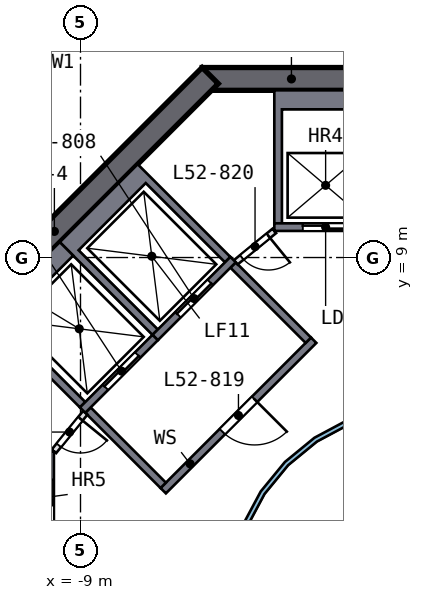
"""IFC4 building model, lengths in metres.
Left out: names, types, materials, properties, quantities, classifications, styles, units other than length and angle.
Written with IfcOpenShell. Run it as: python <this file> out.ifc"""

import sys

from ifc_helpers import new_model, si_unit, direction, frame, frame_2d, origin, place, context, subcontext, project, spatial, polyline, rectangle, outline, extrude, element, fill, save


model = new_model("IFC4")
c1 = context("Model", 3, precision=1e-05, world=origin(), true_north=direction((0.0, 1.0)))
c2 = subcontext(c1, "Body", "Model", "MODEL_VIEW")
j1 = project(units=[si_unit("LENGTHUNIT", "METRE"), si_unit("PLANEANGLEUNIT", "RADIAN")], contexts=[c1])
p1 = place(None, origin())
s1 = spatial("IfcSite", under=j1, at=p1, CompositionType="ELEMENT")
p2 = place(p1, origin())
s2 = spatial("IfcBuilding", under=s1, at=p2, CompositionType="ELEMENT")
p3 = place(p2, frame((0.0, 0.0, 212.5)))
s3 = spatial("IfcBuildingStorey", under=s2, at=p3, CompositionType="ELEMENT", Elevation=212.5)
p4 = place(p3, frame((5.799, 13.7, 0.0), z_axis=(0.0, 0.0, 1.0), x_axis=(-1.0, 0.0, 0.0)))
e1 = element("IfcWall", 1, at=p4, inside=s3, PredefinedType="SHEAR", context=c2, shape_type="SweptSolid", body=[
    extrude(rectangle(XDim=11.598, YDim=0.6, at=frame_2d((5.799, 0.0))), origin(), (0.0, 0.0, 1.0), 3.5),
])
p5 = place(p4, frame((4.899, 0.0, 0.0)))
e2 = element("IfcOpeningElement", 2, at=p5, cuts=e1, PredefinedType="OPENING", context=c2, shape_type="SweptSolid", body=[
    extrude(rectangle(XDim=1.8, YDim=2.1, at=frame_2d((0.9, 1.05))), frame((0.0, 0.31, 0.0), z_axis=(0.0, -1.0, 0.0), x_axis=(1.0, 0.0, 0.0)), (0.0, 0.0, 1.0), 0.62),
])
p6 = place(p3, frame((-5.587, 13.788, 0.0), z_axis=(0.0, 0.0, 1.0), x_axis=(-0.707106781, -0.707106781, 0.0)))
e3 = element("IfcWall", 3, at=p6, inside=s3, PredefinedType="SHEAR", context=c2, shape_type="SweptSolid", body=[
    extrude(rectangle(XDim=11.598, YDim=0.6, at=frame_2d((5.799, 0.0))), origin(), (0.0, 0.0, 1.0), 3.5),
])
p7 = place(p3, origin())
e4 = element("IfcWall", 4, at=p7, inside=s3, PredefinedType="SOLIDWALL", context=c2, shape_type="SweptSolid", body=[
    extrude(outline(polyline([(-3.9, 13.4), (-1.2, 13.4), (-1.2, 9.9), (-1.4, 9.9), (-1.4, 12.9), (-3.7, 12.9), (-3.7, 9.9), (-3.9, 9.9), (-3.9, 13.4)])), origin(), (0.0, 0.0, 1.0), 3.0),
])
p8 = place(p3, frame((-1.2, 9.8, 0.0), z_axis=(0.0, 0.0, 1.0), x_axis=(-1.0, 0.0, 0.0)))
e5 = element("IfcWall", 5, at=p8, inside=s3, PredefinedType="SOLIDWALL", context=c2, shape_type="SweptSolid", body=[
    extrude(rectangle(XDim=2.7, YDim=0.2, at=frame_2d((1.35, 0.0))), origin(), (0.0, 0.0, 1.0), 3.0),
])
p9 = place(p8, frame((0.75, 0.0, 0.0)))
e6 = element("IfcOpeningElement", 6, at=p9, cuts=e5, PredefinedType="OPENING", context=c2, shape_type="SweptSolid", body=[
    extrude(rectangle(XDim=1.2, YDim=2.1, at=frame_2d((0.6, 1.05))), frame((0.0, 0.11, 0.0), z_axis=(0.0, -1.0, 0.0), x_axis=(1.0, 0.0, 0.0)), (0.0, 0.0, 1.0), 0.22),
])
p10 = place(p3, frame((-9.8, 1.2, 0.0), z_axis=(0.0, 0.0, 1.0), x_axis=(0.0, 1.0, 0.0)))
e7 = element("IfcWall", 7, at=p10, inside=s3, PredefinedType="SOLIDWALL", context=c2, shape_type="SweptSolid", body=[
    extrude(rectangle(XDim=2.7, YDim=0.2, at=frame_2d((1.35, 0.0))), origin(), (0.0, 0.0, 1.0), 3.0),
])
p11 = place(p10, frame((0.75, 0.0, 0.0)))
e8 = element("IfcOpeningElement", 8, at=p11, cuts=e7, PredefinedType="OPENING", context=c2, shape_type="SweptSolid", body=[
    extrude(rectangle(XDim=1.2, YDim=2.1, at=frame_2d((0.6, 1.05))), frame((0.0, 0.11, 0.0), z_axis=(0.0, -1.0, 0.0), x_axis=(1.0, 0.0, 0.0)), (0.0, 0.0, 1.0), 0.22),
])
p12 = place(p3, origin())
e9 = element("IfcWall", 9, at=p12, inside=s3, PredefinedType="SOLIDWALL", context=c2, shape_type="SweptSolid", body=[
    extrude(outline(polyline([(-9.546, 9.405), (-7.495, 11.455), (-5.056, 9.016), (-5.197, 8.874), (-7.283, 10.96), (-9.051, 9.192), (-6.965, 7.106), (-7.106, 6.965), (-9.546, 9.405)])), origin(), (0.0, 0.0, 1.0), 3.0),
])
p13 = place(p3, frame((-4.985, 8.945, 0.0), z_axis=(0.0, 0.0, 1.0), x_axis=(-0.707106781, -0.707106781, 0.0)))
e10 = element("IfcWall", 10, at=p13, inside=s3, PredefinedType="SOLIDWALL", context=c2, shape_type="SweptSolid", body=[
    extrude(rectangle(XDim=2.9, YDim=0.2, at=frame_2d((1.45, 0.0))), origin(), (0.0, 0.0, 1.0), 3.0),
])
p14 = place(p13, frame((0.85, 0.0, 0.0)))
e11 = element("IfcOpeningElement", 11, at=p14, cuts=e10, PredefinedType="OPENING", context=c2, shape_type="SweptSolid", body=[
    extrude(rectangle(XDim=1.2, YDim=2.1, at=frame_2d((0.6, 1.05))), frame((0.0, 0.11, 0.0), z_axis=(0.0, -1.0, 0.0), x_axis=(1.0, 0.0, 0.0)), (0.0, 0.0, 1.0), 0.22),
])
p15 = place(p3, origin())
e12 = element("IfcWall", 12, at=p15, inside=s3, PredefinedType="SOLIDWALL", context=c2, shape_type="SweptSolid", body=[
    extrude(outline(polyline([(-11.455, 7.495), (-9.546, 9.405), (-9.192, 9.051), (-10.96, 7.283), (-8.874, 5.197), (-9.016, 5.056), (-11.455, 7.495)])), origin(), (0.0, 0.0, 1.0), 3.0),
])
p16 = place(p3, frame((-7.036, 6.894, 0.0), z_axis=(0.0, 0.0, 1.0), x_axis=(-0.707106781, -0.707106781, 0.0)))
e13 = element("IfcWall", 13, at=p16, inside=s3, PredefinedType="SOLIDWALL", context=c2, shape_type="SweptSolid", body=[
    extrude(rectangle(XDim=2.7, YDim=0.2, at=frame_2d((1.35, 0.0))), origin(), (0.0, 0.0, 1.0), 3.0),
])
p17 = place(p16, frame((0.65, 0.0, 0.0)))
e14 = element("IfcOpeningElement", 14, at=p17, cuts=e13, PredefinedType="OPENING", context=c2, shape_type="SweptSolid", body=[
    extrude(rectangle(XDim=1.2, YDim=2.1, at=frame_2d((0.6, 1.05))), frame((0.0, 0.11, 0.0), z_axis=(0.0, -1.0, 0.0), x_axis=(1.0, 0.0, 0.0)), (0.0, 0.0, 1.0), 0.22),
])
p18 = place(p3, frame((-2.864, 6.823, 0.0), z_axis=(0.0, 0.0, 1.0), x_axis=(-0.707106781, -0.707106781, 0.0)))
e15 = element("IfcWall", 15, at=p18, inside=s3, PredefinedType="SOLIDWALL", context=c2, shape_type="SweptSolid", body=[
    extrude(rectangle(XDim=5.6, YDim=0.2, at=frame_2d((2.8, 0.0))), origin(), (0.0, 0.0, 1.0), 3.0),
])
p19 = place(p18, frame((2.2, 0.0, 0.0)))
e16 = element("IfcOpeningElement", 16, at=p19, cuts=e15, PredefinedType="OPENING", context=c2, shape_type="SweptSolid", body=[
    extrude(rectangle(XDim=1.2, YDim=2.1, at=frame_2d((0.6, 1.05))), frame((0.0, 0.11, 0.0), z_axis=(0.0, -1.0, 0.0), x_axis=(1.0, 0.0, 0.0)), (0.0, 0.0, 1.0), 0.22),
])
for number, where, z_axis, x_axis in (
    (17, (-3.005, 6.823, 0.0), (0.0, 0.0, 1.0), (-0.707, 0.707, 0.0)),
    (18, (-6.823, 3.005, 0.0), (0.0, 0.0, 1.0), (-0.707, 0.707, 0.0)),
):
    element("IfcWall", number, at=place(p3, frame(where, z_axis=z_axis, x_axis=x_axis)), inside=s3, PredefinedType="SOLIDWALL", context=c2, shape_type="SweptSolid", body=[
        extrude(rectangle(XDim=2.8, YDim=0.2, at=frame_2d((1.4, 0.0))), origin(), (0.0, 0.0, 1.0), 3.0),
    ])
p20 = place(p3, frame((-3.9, 9.7, 0.0), z_axis=(0.0, 0.0, 1.0), x_axis=(-0.775559878, -0.631274009, 0.0)))
e19 = element("IfcWall", 19, at=p20, inside=s3, PredefinedType="PARTITIONING", context=c2, shape_type="SweptSolid", body=[
    extrude(rectangle(XDim=1.308, YDim=0.15, at=frame_2d((0.654, 0.0))), origin(), (0.0, 0.0, 1.0), 3.0),
])
p21 = place(p20, frame((0.204, 0.0, 0.0)))
e20 = element("IfcOpeningElement", 20, at=p21, cuts=e19, PredefinedType="OPENING", context=c2, shape_type="SweptSolid", body=[
    extrude(rectangle(XDim=0.9, YDim=2.1, at=frame_2d((0.45, 1.05))), frame((0.0, 0.085, 0.0), z_axis=(0.0, -1.0, 0.0), x_axis=(1.0, 0.0, 0.0)), (0.0, 0.0, 1.0), 0.17),
])
p22 = place(p3, frame((-8.874, 4.914, 0.0), z_axis=(0.0, 0.0, 1.0), x_axis=(-0.631274009, -0.775559878, 0.0)))
e21 = element("IfcWall", 21, at=p22, inside=s3, PredefinedType="PARTITIONING", context=c2, shape_type="SweptSolid", body=[
    extrude(rectangle(XDim=1.308, YDim=0.15, at=frame_2d((0.654, 0.0))), origin(), (0.0, 0.0, 1.0), 3.0),
])
p23 = place(p22, frame((0.204, 0.0, 0.0)))
e22 = element("IfcOpeningElement", 22, at=p23, cuts=e21, PredefinedType="OPENING", context=c2, shape_type="SweptSolid", body=[
    extrude(rectangle(XDim=0.9, YDim=2.1, at=frame_2d((0.45, 1.05))), frame((0.0, 0.085, 0.0), z_axis=(0.0, -1.0, 0.0), x_axis=(1.0, 0.0, 0.0)), (0.0, 0.0, 1.0), 0.17),
])
p24 = place(p3, origin())
e23 = element("IfcWall", 23, at=p24, inside=s3, PredefinedType="SOLIDWALL", context=c2, shape_type="SweptSolid", body=[
    extrude(outline(polyline([(5.021, -0.999), (4.73, -1.959), (4.257, -2.844), (3.62, -3.62), (2.844, -4.257), (1.959, -4.73), (0.999, -5.021), (0.0, -5.12), (-0.999, -5.021), (-1.959, -4.73), (-2.844, -4.257), (-3.62, -3.62), (-4.257, -2.844), (-4.73, -1.959), (-5.021, -0.999), (-5.12, 0.0), (-5.021, 0.999), (-4.73, 1.959), (-4.257, 2.844), (-3.62, 3.62), (-2.844, 4.257), (-1.959, 4.73), (-0.999, 5.021), (0.0, 5.12), (0.999, 5.021), (1.959, 4.73), (2.844, 4.257), (3.62, 3.62), (4.257, 2.844), (4.73, 1.959), (5.021, 0.999), (5.12, 0.0), (5.021, -0.999)]), holes=[polyline([(4.904, 0.976), (4.619, 1.913), (4.157, 2.778), (3.535, 3.535), (2.778, 4.157), (1.913, 4.619), (0.976, 4.904), (0.0, 5.0), (-0.976, 4.904), (-1.913, 4.619), (-2.778, 4.157), (-3.535, 3.535), (-4.157, 2.778), (-4.619, 1.913), (-4.904, 0.976), (-5.0, 0.0), (-4.904, -0.976), (-4.619, -1.913), (-4.157, -2.778), (-3.535, -3.535), (-2.778, -4.157), (-1.913, -4.619), (-0.976, -4.904), (0.0, -5.0), (0.976, -4.904), (1.913, -4.619), (2.778, -4.157), (3.535, -3.535), (4.157, -2.778), (4.619, -1.913), (4.904, -0.976), (5.0, 0.0), (4.904, 0.976)])]), origin(), (0.0, 0.0, 1.0), 3.0),
])
p25 = place(p3, frame((-8.958, 16.055, 0.0), z_axis=(0.0, 0.0, 1.0), x_axis=(-0.717408019, -0.696653238, 0.0)))
e24 = element("IfcWall", 24, at=p25, inside=s3, PredefinedType="SOLIDWALL", context=c2, shape_type="SweptSolid", body=[
    extrude(rectangle(XDim=3.658, YDim=0.2, at=frame_2d((1.829, 0.0))), origin(), (0.0, 0.0, 1.0), 3.0),
])
p26 = place(p9, origin())
e25 = element("IfcDoor", 25, at=p26, inside=s3, OperationType="DOUBLE_DOOR_SLIDING", PredefinedType="DOOR", context=c2, shape_type="SweptSolid", body=[
    extrude(rectangle(XDim=1.2, YDim=2.1, at=frame_2d((0.6, 1.05))), frame((0.0, 0.025, 0.0), z_axis=(0.0, -1.0, 0.0), x_axis=(1.0, 0.0, 0.0)), (0.0, 0.0, 1.0), 0.05),
])
fill(e6, e25)
p27 = place(p14, origin())
e26 = element("IfcDoor", 26, at=p27, inside=s3, OperationType="DOUBLE_DOOR_SLIDING", PredefinedType="DOOR", context=c2, shape_type="SweptSolid", body=[
    extrude(rectangle(XDim=1.2, YDim=2.1, at=frame_2d((0.6, 1.05))), frame((0.0, 0.025, 0.0), z_axis=(0.0, -1.0, 0.0), x_axis=(1.0, 0.0, 0.0)), (0.0, 0.0, 1.0), 0.05),
])
fill(e11, e26)
p28 = place(p17, origin())
e27 = element("IfcDoor", 27, at=p28, inside=s3, OperationType="DOUBLE_DOOR_SLIDING", PredefinedType="DOOR", context=c2, shape_type="SweptSolid", body=[
    extrude(rectangle(XDim=1.2, YDim=2.1, at=frame_2d((0.6, 1.05))), frame((0.0, 0.025, 0.0), z_axis=(0.0, -1.0, 0.0), x_axis=(1.0, 0.0, 0.0)), (0.0, 0.0, 1.0), 0.05),
])
fill(e14, e27)
p29 = place(p19, origin())
e28 = element("IfcDoor", 28, at=p29, inside=s3, OperationType="SINGLE_SWING_LEFT", PredefinedType="DOOR", context=c2, shape_type="SweptSolid", body=[
    extrude(rectangle(XDim=1.2, YDim=2.1, at=frame_2d((0.6, 1.05))), frame((0.0, 0.025, 0.0), z_axis=(0.0, -1.0, 0.0), x_axis=(1.0, 0.0, 0.0)), (0.0, 0.0, 1.0), 0.05),
])
fill(e16, e28)
p30 = place(p21, origin())
e29 = element("IfcDoor", 29, at=p30, inside=s3, OperationType="SINGLE_SWING_LEFT", PredefinedType="DOOR", context=c2, shape_type="SweptSolid", body=[
    extrude(rectangle(XDim=0.9, YDim=2.1, at=frame_2d((0.45, 1.05))), frame((0.0, 0.025, 0.0), z_axis=(0.0, -1.0, 0.0), x_axis=(1.0, 0.0, 0.0)), (0.0, 0.0, 1.0), 0.05),
])
fill(e20, e29)
p31 = place(p23, origin())
e30 = element("IfcDoor", 30, at=p31, inside=s3, OperationType="SINGLE_SWING_LEFT", PredefinedType="DOOR", context=c2, shape_type="SweptSolid", body=[
    extrude(rectangle(XDim=0.9, YDim=2.1, at=frame_2d((0.45, 1.05))), frame((0.0, 0.025, 0.0), z_axis=(0.0, -1.0, 0.0), x_axis=(1.0, 0.0, 0.0)), (0.0, 0.0, 1.0), 0.05),
])
fill(e22, e30)
save(model, sys.argv[1])
